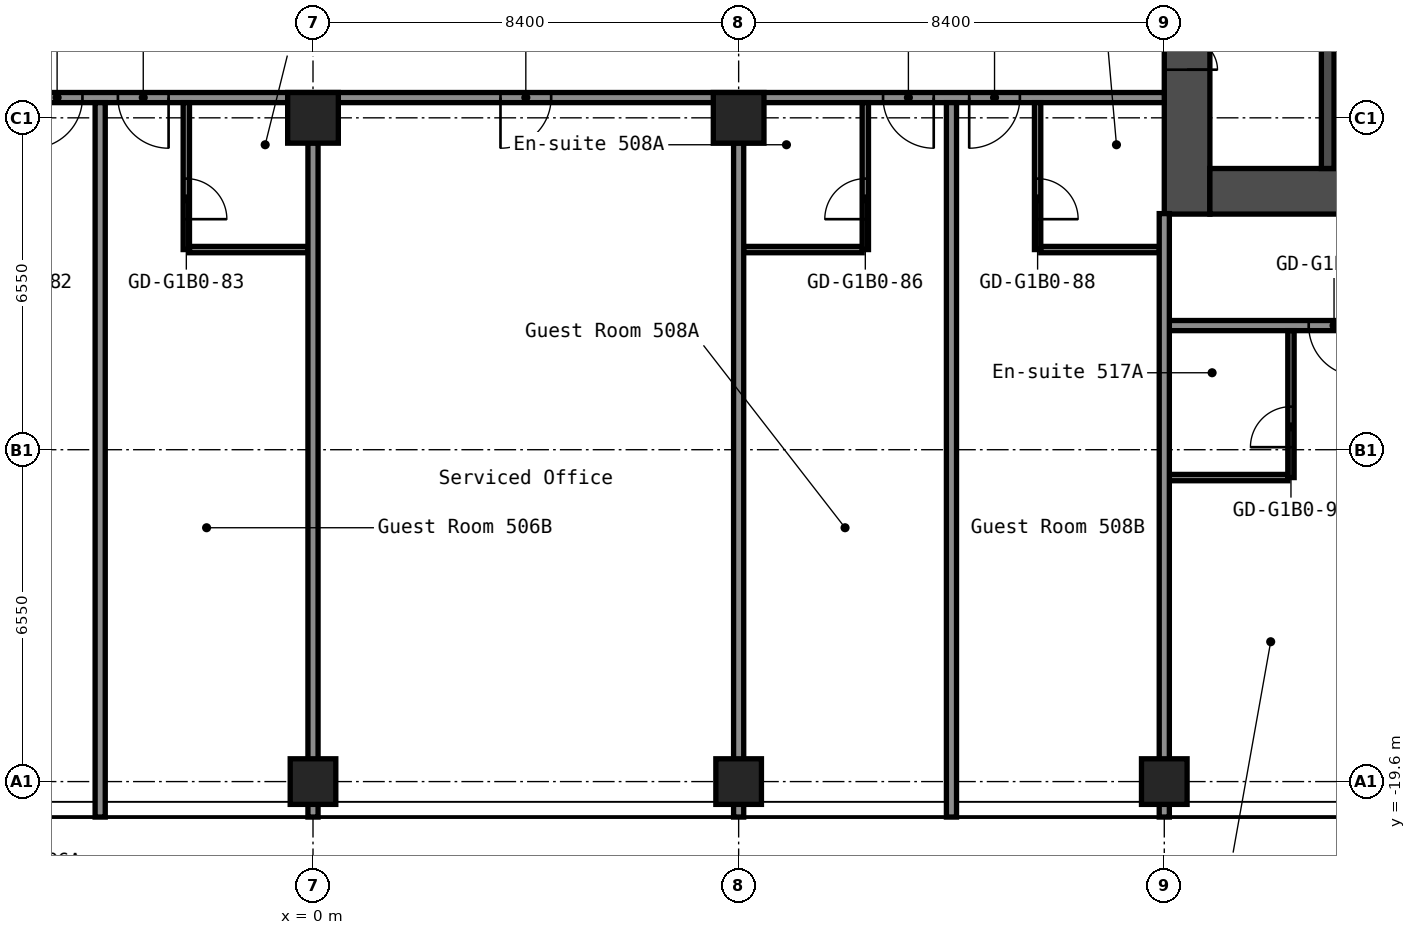
"""IFC4 building model, lengths in metres.
Left out: names, types, materials, properties, quantities, classifications, styles, units other than length and angle.
Written with IfcOpenShell. Run it as: python <this file> out.ifc"""

import sys

from ifc_helpers import new_model, si_unit, direction, frame, frame_2d, origin, origin_2d, place, context, subcontext, project, spatial, rectangle, hollow_rectangle, extrude, element, fill, save


model = new_model("IFC4")
c1 = context("Model", 3, precision=1e-05, world=origin(), true_north=direction((0.0, 1.0)))
c2 = subcontext(c1, "Body", "Model", "MODEL_VIEW")
j1 = project(units=[si_unit("LENGTHUNIT", "METRE"), si_unit("PLANEANGLEUNIT", "RADIAN")], contexts=[c1])
p1 = place(None, origin())
s1 = spatial("IfcSite", under=j1, at=p1, CompositionType="ELEMENT")
p2 = place(p1, origin())
s2 = spatial("IfcBuilding", under=s1, at=p2, CompositionType="ELEMENT")
p3 = place(p2, frame((0.0, 0.0, 23.0)))
s3 = spatial("IfcBuildingStorey", under=s2, at=p3, CompositionType="ELEMENT", Elevation=23.0)
p4 = place(p3, frame((0.0, -19.6, 0.0), z_axis=(0.0, 0.0, 1.0), x_axis=(1.0, 0.0, 0.0)))
e1 = element("IfcColumn", 1, at=p4, inside=s3, PredefinedType="COLUMN", context=c2, shape_type="SweptSolid", body=[
    extrude(hollow_rectangle(XDim=0.9, YDim=0.9, WallThickness=0.036, at=origin_2d()), origin(), (0.0, 0.0, 1.0), 2.8),
])
p5 = place(p3, frame((0.0, -6.5, 0.0), z_axis=(0.0, 0.0, 1.0), x_axis=(1.0, 0.0, 0.0)))
e2 = element("IfcColumn", 2, at=p5, inside=s3, PredefinedType="COLUMN", context=c2, shape_type="SweptSolid", body=[
    extrude(hollow_rectangle(XDim=1.0, YDim=1.0, WallThickness=0.04, at=origin_2d()), origin(), (0.0, 0.0, 1.0), 2.8),
])
p6 = place(p3, frame((8.4, -19.6, 0.0), z_axis=(0.0, 0.0, 1.0), x_axis=(1.0, 0.0, 0.0)))
e3 = element("IfcColumn", 3, at=p6, inside=s3, PredefinedType="COLUMN", context=c2, shape_type="SweptSolid", body=[
    extrude(hollow_rectangle(XDim=0.9, YDim=0.9, WallThickness=0.036, at=origin_2d()), origin(), (0.0, 0.0, 1.0), 2.8),
])
p7 = place(p3, frame((8.4, -6.5, 0.0), z_axis=(0.0, 0.0, 1.0), x_axis=(1.0, 0.0, 0.0)))
e4 = element("IfcColumn", 4, at=p7, inside=s3, PredefinedType="COLUMN", context=c2, shape_type="SweptSolid", body=[
    extrude(hollow_rectangle(XDim=1.0, YDim=1.0, WallThickness=0.04, at=origin_2d()), origin(), (0.0, 0.0, 1.0), 2.8),
])
p8 = place(p3, frame((16.8, -19.6, 0.0), z_axis=(0.0, 0.0, 1.0), x_axis=(1.0, 0.0, 0.0)))
e5 = element("IfcColumn", 5, at=p8, inside=s3, PredefinedType="COLUMN", context=c2, shape_type="SweptSolid", body=[
    extrude(hollow_rectangle(XDim=0.9, YDim=0.9, WallThickness=0.036, at=origin_2d()), origin(), (0.0, 0.0, 1.0), 2.8),
])
p9 = place(p3, frame((17.25, -8.4, 0.0), z_axis=(0.0, 0.0, 1.0), x_axis=(0.0, 1.0, 0.0)))
e6 = element("IfcWall", 6, at=p9, inside=s3, PredefinedType="SHEAR", context=c2, shape_type="SweptSolid", body=[
    extrude(rectangle(XDim=16.8, YDim=0.9, at=frame_2d((8.4, 0.0))), origin(), (0.0, 0.0, 1.0), 2.8),
])
p10 = place(p9, frame((12.75, 0.0, 0.0)))
e7 = element("IfcOpeningElement", 7, at=p10, cuts=e6, PredefinedType="OPENING", context=c2, shape_type="SweptSolid", body=[
    extrude(rectangle(XDim=1.2, YDim=2.1, at=frame_2d((0.6, 1.05))), frame((0.0, 0.46, 0.0), z_axis=(0.0, -1.0, 0.0), x_axis=(1.0, 0.0, 0.0)), (0.0, 0.0, 1.0), 0.92),
])
p11 = place(p9, frame((2.85, 0.0, 0.0)))
e8 = element("IfcOpeningElement", 8, at=p11, cuts=e6, PredefinedType="OPENING", context=c2, shape_type="SweptSolid", body=[
    extrude(rectangle(XDim=1.2, YDim=2.1, at=frame_2d((0.6, 1.05))), frame((0.0, 0.46, 0.0), z_axis=(0.0, -1.0, 0.0), x_axis=(1.0, 0.0, 0.0)), (0.0, 0.0, 1.0), 0.92),
])
p12 = place(p3, frame((17.7, -7.95, 0.0), z_axis=(0.0, 0.0, 1.0), x_axis=(1.0, 0.0, 0.0)))
e9 = element("IfcWall", 9, at=p12, inside=s3, PredefinedType="SHEAR", context=c2, shape_type="SweptSolid", body=[
    extrude(rectangle(XDim=15.0, YDim=0.9, at=frame_2d((7.5, 0.0))), origin(), (0.0, 0.0, 1.0), 2.8),
])
p13 = place(p12, frame((2.55, 0.0, 0.0)))
e10 = element("IfcOpeningElement", 10, at=p13, cuts=e9, PredefinedType="OPENING", context=c2, shape_type="SweptSolid", body=[
    extrude(rectangle(XDim=1.0, YDim=2.1, at=frame_2d((0.5, 1.05))), frame((0.0, 0.46, 0.0), z_axis=(0.0, -1.0, 0.0), x_axis=(1.0, 0.0, 0.0)), (0.0, 0.0, 1.0), 0.92),
])
p14 = place(p3, frame((20.025, -7.5, 0.0), z_axis=(0.0, 0.0, 1.0), x_axis=(0.0, 1.0, 0.0)))
e11 = element("IfcWall", 11, at=p14, inside=s3, PredefinedType="SHEAR", context=c2, shape_type="SweptSolid", body=[
    extrude(rectangle(XDim=6.3, YDim=0.25, at=frame_2d((3.15, 0.0))), origin(), (0.0, 0.0, 1.0), 2.8),
])
p15 = place(p14, frame((2.4, 0.0, 0.0)))
e12 = element("IfcOpeningElement", 12, at=p15, cuts=e11, PredefinedType="OPENING", context=c2, shape_type="SweptSolid", body=[
    extrude(rectangle(XDim=1.0, YDim=2.1, at=frame_2d((0.5, 1.05))), frame((0.0, 0.135, 0.0), z_axis=(0.0, -1.0, 0.0), x_axis=(1.0, 0.0, 0.0)), (0.0, 0.0, 1.0), 0.27),
])
p16 = place(p3, frame((16.9, -13.6, 0.0), z_axis=(0.0, 0.0, 1.0), x_axis=(1.0, 0.0, 0.0)))
e13 = element("IfcWall", 13, at=p16, inside=s3, PredefinedType="PARTITIONING", context=c2, shape_type="SweptSolid", body=[
    extrude(rectangle(XDim=2.338, YDim=0.125, at=frame_2d((1.169, 0.0))), origin(), (0.0, 0.0, 1.0), 2.8),
])
p17 = place(p3, frame((16.8, -10.6, 0.0), z_axis=(0.0, 0.0, 1.0), x_axis=(1.0, 0.0, 0.0)))
e14 = element("IfcWall", 14, at=p17, inside=s3, PredefinedType="PARTITIONING", context=c2, shape_type="SweptSolid", body=[
    extrude(rectangle(XDim=34.3, YDim=0.2, at=frame_2d((17.15, 0.0))), origin(), (0.0, 0.0, 1.0), 2.8),
])
p18 = place(p17, frame((2.85, 0.0, 0.0)))
e15 = element("IfcOpeningElement", 15, at=p18, cuts=e14, PredefinedType="OPENING", context=c2, shape_type="SweptSolid", body=[
    extrude(rectangle(XDim=1.0, YDim=2.1, at=frame_2d((0.5, 1.05))), frame((0.0, 0.11, 0.0), z_axis=(0.0, -1.0, 0.0), x_axis=(1.0, 0.0, 0.0)), (0.0, 0.0, 1.0), 0.22),
])
p19 = place(p17, frame((4.55, 0.0, 0.0)))
e16 = element("IfcOpeningElement", 16, at=p19, cuts=e14, PredefinedType="OPENING", context=c2, shape_type="SweptSolid", body=[
    extrude(rectangle(XDim=1.0, YDim=2.1, at=frame_2d((0.5, 1.05))), frame((0.0, 0.11, 0.0), z_axis=(0.0, -1.0, 0.0), x_axis=(1.0, 0.0, 0.0)), (0.0, 0.0, 1.0), 0.22),
])
p20 = place(p17, frame((11.25, 0.0, 0.0)))
e17 = element("IfcOpeningElement", 17, at=p20, cuts=e14, PredefinedType="OPENING", context=c2, shape_type="SweptSolid", body=[
    extrude(rectangle(XDim=1.0, YDim=2.1, at=frame_2d((0.5, 1.05))), frame((0.0, 0.11, 0.0), z_axis=(0.0, -1.0, 0.0), x_axis=(1.0, 0.0, 0.0)), (0.0, 0.0, 1.0), 0.22),
])
p21 = place(p17, frame((12.95, 0.0, 0.0)))
e18 = element("IfcOpeningElement", 18, at=p21, cuts=e14, PredefinedType="OPENING", context=c2, shape_type="SweptSolid", body=[
    extrude(rectangle(XDim=1.0, YDim=2.1, at=frame_2d((0.5, 1.05))), frame((0.0, 0.11, 0.0), z_axis=(0.0, -1.0, 0.0), x_axis=(1.0, 0.0, 0.0)), (0.0, 0.0, 1.0), 0.22),
])
p22 = place(p17, frame((19.65, 0.0, 0.0)))
e19 = element("IfcOpeningElement", 19, at=p22, cuts=e14, PredefinedType="OPENING", context=c2, shape_type="SweptSolid", body=[
    extrude(rectangle(XDim=1.0, YDim=2.1, at=frame_2d((0.5, 1.05))), frame((0.0, 0.11, 0.0), z_axis=(0.0, -1.0, 0.0), x_axis=(1.0, 0.0, 0.0)), (0.0, 0.0, 1.0), 0.22),
])
p23 = place(p17, frame((21.35, 0.0, 0.0)))
e20 = element("IfcOpeningElement", 20, at=p23, cuts=e14, PredefinedType="OPENING", context=c2, shape_type="SweptSolid", body=[
    extrude(rectangle(XDim=1.0, YDim=2.1, at=frame_2d((0.5, 1.05))), frame((0.0, 0.11, 0.0), z_axis=(0.0, -1.0, 0.0), x_axis=(1.0, 0.0, 0.0)), (0.0, 0.0, 1.0), 0.22),
])
p24 = place(p17, frame((28.15, 0.0, 0.0)))
e21 = element("IfcOpeningElement", 21, at=p24, cuts=e14, PredefinedType="OPENING", context=c2, shape_type="SweptSolid", body=[
    extrude(rectangle(XDim=1.0, YDim=2.1, at=frame_2d((0.5, 1.05))), frame((0.0, 0.11, 0.0), z_axis=(0.0, -1.0, 0.0), x_axis=(1.0, 0.0, 0.0)), (0.0, 0.0, 1.0), 0.22),
])
p25 = place(p17, frame((30.05, 0.0, 0.0)))
e22 = element("IfcOpeningElement", 22, at=p25, cuts=e14, PredefinedType="OPENING", context=c2, shape_type="SweptSolid", body=[
    extrude(rectangle(XDim=1.0, YDim=2.1, at=frame_2d((0.5, 1.05))), frame((0.0, 0.11, 0.0), z_axis=(0.0, -1.0, 0.0), x_axis=(1.0, 0.0, 0.0)), (0.0, 0.0, 1.0), 0.22),
])
for number, where, z_axis, x_axis in (
    (23, (-2.438, -9.1, 0.0), (0.0, 0.0, 1.0), (1.0, 0.0, 0.0)),
    (24, (8.5, -9.1, 0.0), (0.0, 0.0, 1.0), (1.0, 0.0, 0.0)),
    (25, (14.363, -9.1, 0.0), (0.0, 0.0, 1.0), (1.0, 0.0, 0.0)),
):
    element("IfcWall", number, at=place(p3, frame(where, z_axis=z_axis, x_axis=x_axis)), inside=s3, PredefinedType="PARTITIONING", context=c2, shape_type="SweptSolid", body=[
        extrude(rectangle(XDim=2.337, YDim=0.125, at=frame_2d((1.169, 0.0))), origin(), (0.0, 0.0, 1.0), 2.8),
    ])
p26 = place(p3, frame((-16.8, -6.1, 0.0), z_axis=(0.0, 0.0, 1.0), x_axis=(1.0, 0.0, 0.0)))
e26 = element("IfcWall", 26, at=p26, inside=s3, PredefinedType="PARTITIONING", context=c2, shape_type="SweptSolid", body=[
    extrude(rectangle(XDim=33.6, YDim=0.2, at=frame_2d((16.8, 0.0))), origin(), (0.0, 0.0, 1.0), 2.8),
])
p27 = place(p26, frame((2.85, 0.0, 0.0)))
e27 = element("IfcOpeningElement", 27, at=p27, cuts=e26, PredefinedType="OPENING", context=c2, shape_type="SweptSolid", body=[
    extrude(rectangle(XDim=1.0, YDim=2.1, at=frame_2d((0.5, 1.05))), frame((0.0, 0.11, 0.0), z_axis=(0.0, -1.0, 0.0), x_axis=(1.0, 0.0, 0.0)), (0.0, 0.0, 1.0), 0.22),
])
p28 = place(p26, frame((4.55, 0.0, 0.0)))
e28 = element("IfcOpeningElement", 28, at=p28, cuts=e26, PredefinedType="OPENING", context=c2, shape_type="SweptSolid", body=[
    extrude(rectangle(XDim=1.0, YDim=2.1, at=frame_2d((0.5, 1.05))), frame((0.0, 0.11, 0.0), z_axis=(0.0, -1.0, 0.0), x_axis=(1.0, 0.0, 0.0)), (0.0, 0.0, 1.0), 0.22),
])
p29 = place(p26, frame((11.25, 0.0, 0.0)))
e29 = element("IfcOpeningElement", 29, at=p29, cuts=e26, PredefinedType="OPENING", context=c2, shape_type="SweptSolid", body=[
    extrude(rectangle(XDim=1.0, YDim=2.1, at=frame_2d((0.5, 1.05))), frame((0.0, 0.11, 0.0), z_axis=(0.0, -1.0, 0.0), x_axis=(1.0, 0.0, 0.0)), (0.0, 0.0, 1.0), 0.22),
])
p30 = place(p26, frame((12.95, 0.0, 0.0)))
e30 = element("IfcOpeningElement", 30, at=p30, cuts=e26, PredefinedType="OPENING", context=c2, shape_type="SweptSolid", body=[
    extrude(rectangle(XDim=1.0, YDim=2.1, at=frame_2d((0.5, 1.05))), frame((0.0, 0.11, 0.0), z_axis=(0.0, -1.0, 0.0), x_axis=(1.0, 0.0, 0.0)), (0.0, 0.0, 1.0), 0.22),
])
p31 = place(p26, frame((20.5, 0.0, 0.0)))
e31 = element("IfcOpeningElement", 31, at=p31, cuts=e26, PredefinedType="OPENING", context=c2, shape_type="SweptSolid", body=[
    extrude(rectangle(XDim=1.0, YDim=2.1, at=frame_2d((0.5, 1.05))), frame((0.0, 0.11, 0.0), z_axis=(0.0, -1.0, 0.0), x_axis=(1.0, 0.0, 0.0)), (0.0, 0.0, 1.0), 0.22),
])
p32 = place(p26, frame((28.05, 0.0, 0.0)))
e32 = element("IfcOpeningElement", 32, at=p32, cuts=e26, PredefinedType="OPENING", context=c2, shape_type="SweptSolid", body=[
    extrude(rectangle(XDim=1.0, YDim=2.1, at=frame_2d((0.5, 1.05))), frame((0.0, 0.11, 0.0), z_axis=(0.0, -1.0, 0.0), x_axis=(1.0, 0.0, 0.0)), (0.0, 0.0, 1.0), 0.22),
])
p33 = place(p26, frame((29.75, 0.0, 0.0)))
e33 = element("IfcOpeningElement", 33, at=p33, cuts=e26, PredefinedType="OPENING", context=c2, shape_type="SweptSolid", body=[
    extrude(rectangle(XDim=1.0, YDim=2.1, at=frame_2d((0.5, 1.05))), frame((0.0, 0.11, 0.0), z_axis=(0.0, -1.0, 0.0), x_axis=(1.0, 0.0, 0.0)), (0.0, 0.0, 1.0), 0.22),
])
p34 = place(p3, frame((-4.2, -20.3, 0.0), z_axis=(0.0, 0.0, 1.0), x_axis=(0.0, 1.0, 0.0)))
e34 = element("IfcWall", 34, at=p34, inside=s3, PredefinedType="PARTITIONING", context=c2, shape_type="SweptSolid", body=[
    extrude(rectangle(XDim=14.1, YDim=0.2, at=frame_2d((7.05, 0.0))), origin(), (0.0, 0.0, 1.0), 2.8),
])
p35 = place(p3, frame((-2.5, -9.1, 0.0), z_axis=(0.0, 0.0, 1.0), x_axis=(0.0, 1.0, 0.0)))
e35 = element("IfcWall", 35, at=p35, inside=s3, PredefinedType="PARTITIONING", context=c2, shape_type="SweptSolid", body=[
    extrude(rectangle(XDim=2.9, YDim=0.125, at=frame_2d((1.45, 0.0))), origin(), (0.0, 0.0, 1.0), 2.8),
])
p36 = place(p35, frame((0.6, 0.0, 0.0)))
e36 = element("IfcOpeningElement", 36, at=p36, cuts=e35, PredefinedType="OPENING", context=c2, shape_type="SweptSolid", body=[
    extrude(rectangle(XDim=0.8, YDim=2.1, at=frame_2d((0.4, 1.05))), frame((0.0, 0.073, 0.0), z_axis=(0.0, -1.0, 0.0), x_axis=(1.0, 0.0, 0.0)), (0.0, 0.0, 1.0), 0.145),
])
for number, where, z_axis, x_axis in (
    (37, (0.0, -20.3, 0.0), (0.0, 0.0, 1.0), (0.0, 1.0, 0.0)),
    (38, (8.4, -20.3, 0.0), (0.0, 0.0, 1.0), (0.0, 1.0, 0.0)),
):
    element("IfcWall", number, at=place(p3, frame(where, z_axis=z_axis, x_axis=x_axis)), inside=s3, PredefinedType="PARTITIONING", context=c2, shape_type="SweptSolid", body=[
        extrude(rectangle(XDim=13.31, YDim=0.2, at=frame_2d((6.655, 0.0))), origin(), (0.0, 0.0, 1.0), 2.8),
    ])
p37 = place(p3, frame((10.9, -9.1, 0.0), z_axis=(0.0, 0.0, 1.0), x_axis=(0.0, 1.0, 0.0)))
e39 = element("IfcWall", 39, at=p37, inside=s3, PredefinedType="PARTITIONING", context=c2, shape_type="SweptSolid", body=[
    extrude(rectangle(XDim=2.9, YDim=0.125, at=frame_2d((1.45, 0.0))), origin(), (0.0, 0.0, 1.0), 2.8),
])
p38 = place(p37, frame((0.6, 0.0, 0.0)))
e40 = element("IfcOpeningElement", 40, at=p38, cuts=e39, PredefinedType="OPENING", context=c2, shape_type="SweptSolid", body=[
    extrude(rectangle(XDim=0.8, YDim=2.1, at=frame_2d((0.4, 1.05))), frame((0.0, 0.073, 0.0), z_axis=(0.0, -1.0, 0.0), x_axis=(1.0, 0.0, 0.0)), (0.0, 0.0, 1.0), 0.145),
])
p39 = place(p3, frame((12.6, -20.3, 0.0), z_axis=(0.0, 0.0, 1.0), x_axis=(0.0, 1.0, 0.0)))
e41 = element("IfcWall", 41, at=p39, inside=s3, PredefinedType="PARTITIONING", context=c2, shape_type="SweptSolid", body=[
    extrude(rectangle(XDim=14.1, YDim=0.2, at=frame_2d((7.05, 0.0))), origin(), (0.0, 0.0, 1.0), 2.8),
])
p40 = place(p3, frame((14.3, -9.1, 0.0), z_axis=(0.0, 0.0, 1.0), x_axis=(0.0, 1.0, 0.0)))
e42 = element("IfcWall", 42, at=p40, inside=s3, PredefinedType="PARTITIONING", context=c2, shape_type="SweptSolid", body=[
    extrude(rectangle(XDim=2.9, YDim=0.125, at=frame_2d((1.45, 0.0))), origin(), (0.0, 0.0, 1.0), 2.8),
])
p41 = place(p40, frame((0.6, 0.0, 0.0)))
e43 = element("IfcOpeningElement", 43, at=p41, cuts=e42, PredefinedType="OPENING", context=c2, shape_type="SweptSolid", body=[
    extrude(rectangle(XDim=0.8, YDim=2.1, at=frame_2d((0.4, 1.05))), frame((0.0, 0.073, 0.0), z_axis=(0.0, -1.0, 0.0), x_axis=(1.0, 0.0, 0.0)), (0.0, 0.0, 1.0), 0.145),
])
p42 = place(p3, frame((16.8, -20.3, 0.0), z_axis=(0.0, 0.0, 1.0), x_axis=(0.0, 1.0, 0.0)))
e44 = element("IfcWall", 44, at=p42, inside=s3, PredefinedType="PARTITIONING", context=c2, shape_type="SweptSolid", body=[
    extrude(rectangle(XDim=11.91, YDim=0.2, at=frame_2d((5.955, 0.0))), origin(), (0.0, 0.0, 1.0), 2.8),
])
p43 = place(p3, frame((19.3, -13.6, 0.0), z_axis=(0.0, 0.0, 1.0), x_axis=(0.0, 1.0, 0.0)))
e45 = element("IfcWall", 45, at=p43, inside=s3, PredefinedType="PARTITIONING", context=c2, shape_type="SweptSolid", body=[
    extrude(rectangle(XDim=2.9, YDim=0.125, at=frame_2d((1.45, 0.0))), origin(), (0.0, 0.0, 1.0), 2.8),
])
p44 = place(p43, frame((0.6, 0.0, 0.0)))
e46 = element("IfcOpeningElement", 46, at=p44, cuts=e45, PredefinedType="OPENING", context=c2, shape_type="SweptSolid", body=[
    extrude(rectangle(XDim=0.8, YDim=2.1, at=frame_2d((0.4, 1.05))), frame((0.0, 0.073, 0.0), z_axis=(0.0, -1.0, 0.0), x_axis=(1.0, 0.0, 0.0)), (0.0, 0.0, 1.0), 0.145),
])
p45 = place(p11, origin())
e47 = element("IfcDoor", 47, at=p45, inside=s3, OperationType="DOUBLE_DOOR_SINGLE_SWING", PredefinedType="DOOR", context=c2, shape_type="SweptSolid", body=[
    extrude(rectangle(XDim=1.2, YDim=2.1, at=frame_2d((0.6, 1.05))), frame((0.0, 0.025, 0.0), z_axis=(0.0, -1.0, 0.0), x_axis=(1.0, 0.0, 0.0)), (0.0, 0.0, 1.0), 0.05),
])
fill(e8, e47)
p46 = place(p18, origin())
e48 = element("IfcDoor", 48, at=p46, inside=s3, OperationType="SINGLE_SWING_RIGHT", PredefinedType="DOOR", context=c2, shape_type="SweptSolid", body=[
    extrude(rectangle(XDim=1.0, YDim=2.1, at=frame_2d((0.5, 1.05))), frame((0.0, 0.025, 0.0), z_axis=(0.0, -1.0, 0.0), x_axis=(1.0, 0.0, 0.0)), (0.0, 0.0, 1.0), 0.05),
])
fill(e15, e48)
p47 = place(p29, origin())
e49 = element("IfcDoor", 49, at=p47, inside=s3, OperationType="SINGLE_SWING_LEFT", PredefinedType="DOOR", context=c2, shape_type="SweptSolid", body=[
    extrude(rectangle(XDim=1.0, YDim=2.1, at=frame_2d((0.5, 1.05))), frame((0.0, 0.025, 0.0), z_axis=(0.0, -1.0, 0.0), x_axis=(1.0, 0.0, 0.0)), (0.0, 0.0, 1.0), 0.05),
])
fill(e29, e49)
p48 = place(p30, origin())
e50 = element("IfcDoor", 50, at=p48, inside=s3, OperationType="SINGLE_SWING_RIGHT", PredefinedType="DOOR", context=c2, shape_type="SweptSolid", body=[
    extrude(rectangle(XDim=1.0, YDim=2.1, at=frame_2d((0.5, 1.05))), frame((0.0, 0.025, 0.0), z_axis=(0.0, -1.0, 0.0), x_axis=(1.0, 0.0, 0.0)), (0.0, 0.0, 1.0), 0.05),
])
fill(e30, e50)
p49 = place(p31, origin())
e51 = element("IfcDoor", 51, at=p49, inside=s3, OperationType="SINGLE_SWING_LEFT", PredefinedType="DOOR", context=c2, shape_type="SweptSolid", body=[
    extrude(rectangle(XDim=1.0, YDim=2.1, at=frame_2d((0.5, 1.05))), frame((0.0, 0.025, 0.0), z_axis=(0.0, -1.0, 0.0), x_axis=(1.0, 0.0, 0.0)), (0.0, 0.0, 1.0), 0.05),
])
fill(e31, e51)
p50 = place(p32, origin())
e52 = element("IfcDoor", 52, at=p50, inside=s3, OperationType="SINGLE_SWING_RIGHT", PredefinedType="DOOR", context=c2, shape_type="SweptSolid", body=[
    extrude(rectangle(XDim=1.0, YDim=2.1, at=frame_2d((0.5, 1.05))), frame((0.0, 0.025, 0.0), z_axis=(0.0, -1.0, 0.0), x_axis=(1.0, 0.0, 0.0)), (0.0, 0.0, 1.0), 0.05),
])
fill(e32, e52)
p51 = place(p33, origin())
e53 = element("IfcDoor", 53, at=p51, inside=s3, OperationType="SINGLE_SWING_LEFT", PredefinedType="DOOR", context=c2, shape_type="SweptSolid", body=[
    extrude(rectangle(XDim=1.0, YDim=2.1, at=frame_2d((0.5, 1.05))), frame((0.0, 0.025, 0.0), z_axis=(0.0, -1.0, 0.0), x_axis=(1.0, 0.0, 0.0)), (0.0, 0.0, 1.0), 0.05),
])
fill(e33, e53)
p52 = place(p36, origin())
e54 = element("IfcDoor", 54, at=p52, inside=s3, OperationType="SINGLE_SWING_LEFT", PredefinedType="DOOR", context=c2, shape_type="SweptSolid", body=[
    extrude(rectangle(XDim=0.8, YDim=2.1, at=frame_2d((0.4, 1.05))), frame((0.0, 0.025, 0.0), z_axis=(0.0, -1.0, 0.0), x_axis=(1.0, 0.0, 0.0)), (0.0, 0.0, 1.0), 0.05),
])
fill(e36, e54)
p53 = place(p38, origin())
e55 = element("IfcDoor", 55, at=p53, inside=s3, OperationType="SINGLE_SWING_RIGHT", PredefinedType="DOOR", context=c2, shape_type="SweptSolid", body=[
    extrude(rectangle(XDim=0.8, YDim=2.1, at=frame_2d((0.4, 1.05))), frame((0.0, 0.025, 0.0), z_axis=(0.0, -1.0, 0.0), x_axis=(1.0, 0.0, 0.0)), (0.0, 0.0, 1.0), 0.05),
])
fill(e40, e55)
p54 = place(p41, origin())
e56 = element("IfcDoor", 56, at=p54, inside=s3, OperationType="SINGLE_SWING_LEFT", PredefinedType="DOOR", context=c2, shape_type="SweptSolid", body=[
    extrude(rectangle(XDim=0.8, YDim=2.1, at=frame_2d((0.4, 1.05))), frame((0.0, 0.025, 0.0), z_axis=(0.0, -1.0, 0.0), x_axis=(1.0, 0.0, 0.0)), (0.0, 0.0, 1.0), 0.05),
])
fill(e43, e56)
p55 = place(p44, origin())
e57 = element("IfcDoor", 57, at=p55, inside=s3, OperationType="SINGLE_SWING_RIGHT", PredefinedType="DOOR", context=c2, shape_type="SweptSolid", body=[
    extrude(rectangle(XDim=0.8, YDim=2.1, at=frame_2d((0.4, 1.05))), frame((0.0, 0.025, 0.0), z_axis=(0.0, -1.0, 0.0), x_axis=(1.0, 0.0, 0.0)), (0.0, 0.0, 1.0), 0.05),
])
fill(e46, e57)
save(model, sys.argv[1])
